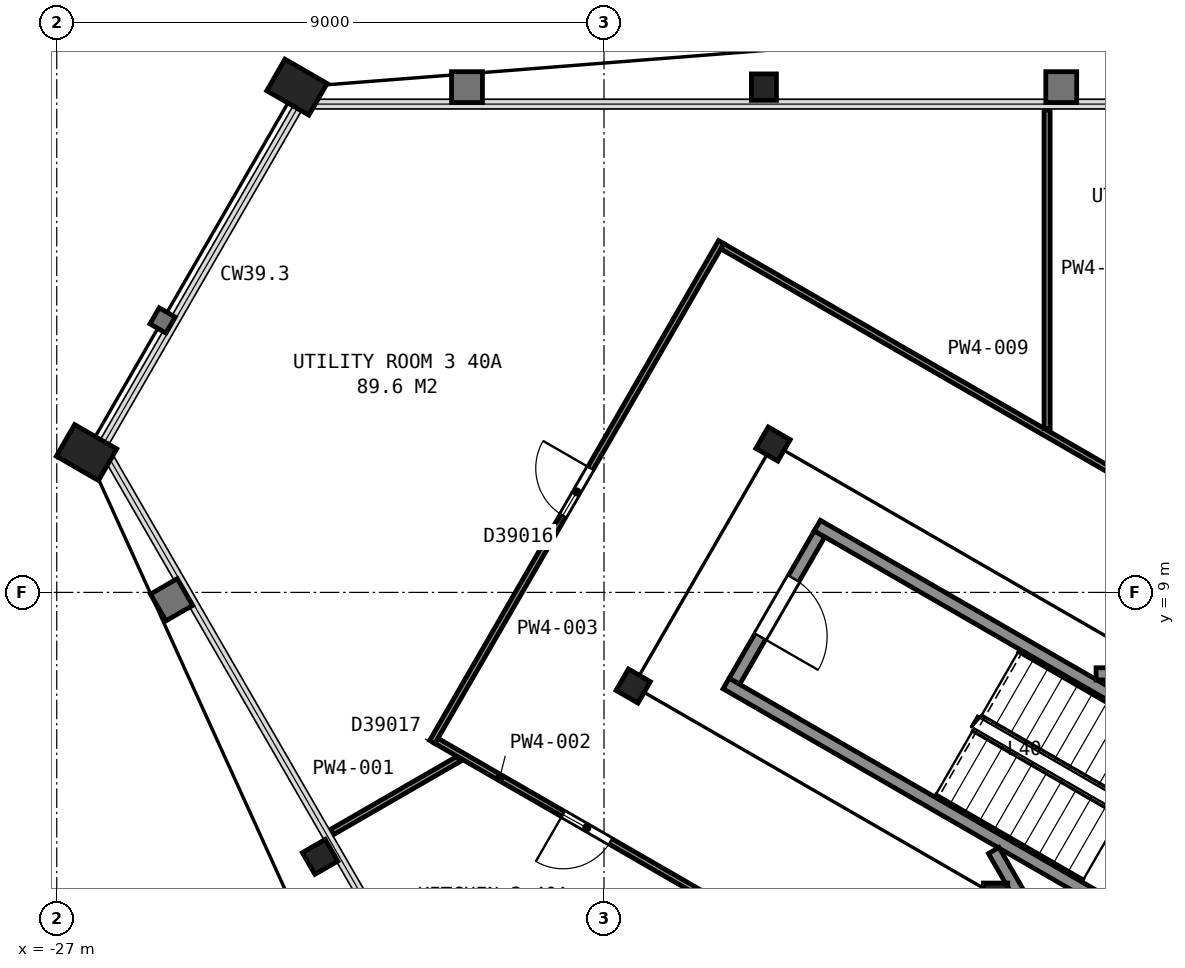
"""IFC4 building model, lengths in metres.
Left out: names, types, materials, properties, quantities, classifications, styles, units other than length and angle.
Written with IfcOpenShell. Run it as: python <this file> out.ifc"""

import sys

from ifc_helpers import new_model, si_unit, direction, frame, frame_2d, origin, origin_2d, place, context, subcontext, project, spatial, rectangle, hollow_rectangle, i_section, extrude, element, fill, save


model = new_model("IFC4")
c1 = context("Model", 3, precision=1e-05, world=origin(), true_north=direction((0.0, 1.0)))
c2 = subcontext(c1, "Body", "Model", "MODEL_VIEW")
j1 = project(units=[si_unit("LENGTHUNIT", "METRE"), si_unit("PLANEANGLEUNIT", "RADIAN")], contexts=[c1])
p1 = place(None, origin())
s1 = spatial("IfcSite", under=j1, at=p1, CompositionType="ELEMENT")
p2 = place(p1, origin())
s2 = spatial("IfcBuilding", under=s1, at=p2, CompositionType="ELEMENT")
p3 = place(p2, frame((0.0, 0.0, 163.6)))
s3 = spatial("IfcBuildingStorey", under=s2, at=p3, CompositionType="ELEMENT", Elevation=163.6)
p4 = place(p3, frame((-15.37, 17.31, 0.0), z_axis=(0.0, 0.0, 1.0), x_axis=(1.0, 0.0, 0.0)))
e1 = element("IfcColumn", 1, at=p4, inside=s3, PredefinedType="COLUMN", context=c2, shape_type="SweptSolid", body=[
    extrude(i_section(OverallWidth=0.411, OverallDepth=0.434, WebThickness=0.036, FlangeThickness=0.057, FilletRadius=0.015, at=origin_2d()), origin(), (0.0, 0.0, 1.0), 3.7),
])
for number, where, z_axis, x_axis in (
    (2, (-23.05, 17.31, 0.0), (0.0, 0.0, 1.0), (0.5, 0.866, 0.0)),
    (3, (-26.51, 11.3, 0.0), (0.0, 0.0, 1.0), (0.5, 0.866, 0.0)),
):
    element("IfcColumn", number, at=place(p3, frame(where, z_axis=z_axis, x_axis=x_axis)), inside=s3, PredefinedType="COLUMN", context=c2, shape_type="SweptSolid", body=[
        extrude(hollow_rectangle(XDim=0.6, YDim=0.8, WallThickness=0.05, at=origin_2d()), origin(), (0.0, 0.0, 1.0), 3.7),
    ])
p5 = place(p3, frame((-22.67, 4.65, 0.0), z_axis=(0.0, 0.0, 1.0), x_axis=(-0.5, 0.866025403784, 0.0)))
e4 = element("IfcColumn", 4, at=p5, inside=s3, PredefinedType="COLUMN", context=c2, shape_type="SweptSolid", body=[
    extrude(i_section(OverallWidth=0.411, OverallDepth=0.434, WebThickness=0.036, FlangeThickness=0.057, FilletRadius=0.015, at=origin_2d()), origin(), (0.0, 0.0, 1.0), 3.7),
])
for number, where, z_axis, x_axis in (
    (5, (-15.22, 11.44, 0.0), (0.0, 0.0, 1.0), (0.5, 0.866, 0.0)),
    (6, (-17.52, 7.46, 0.0), (0.0, 0.0, 1.0), (0.5, 0.866, 0.0)),
):
    element("IfcColumn", number, at=place(p3, frame(where, z_axis=z_axis, x_axis=x_axis)), inside=s3, PredefinedType="COLUMN", context=c2, shape_type="SweptSolid", body=[
        extrude(i_section(OverallWidth=0.406, OverallDepth=0.417, WebThickness=0.03, FlangeThickness=0.048, FilletRadius=0.015, at=origin_2d()), origin(), (0.0, 0.0, 1.0), 3.7),
    ])
p6 = place(p3, frame((-11.56, 4.02, 0.0), z_axis=(0.0, 0.0, 1.0), x_axis=(1.0, 0.0, 0.0)))
e7 = element("IfcColumn", 7, at=p6, inside=s3, PredefinedType="COLUMN", context=c2, shape_type="SweptSolid", body=[
    extrude(i_section(OverallWidth=0.401, OverallDepth=0.399, WebThickness=0.025, FlangeThickness=0.04, FilletRadius=0.015, at=origin_2d()), origin(), (0.0, 0.0, 1.0), 3.7),
])
p7 = place(p3, frame((-14.455, 9.962, 0.0), z_axis=(0.0, 0.0, 1.0), x_axis=(-0.500049511043, -0.865996816683, 0.0)))
e8 = element("IfcWall", 8, at=p7, inside=s3, PredefinedType="PARTITIONING", context=c2, shape_type="SweptSolid", body=[
    extrude(rectangle(XDim=2.8, YDim=0.2, at=frame_2d((1.4, 0.0))), origin(), (0.0, 0.0, 1.0), 3.45),
])
p8 = place(p7, frame((0.85, 0.0, 0.0)))
e9 = element("IfcOpeningElement", 9, at=p8, cuts=e8, PredefinedType="OPENING", context=c2, shape_type="SweptSolid", body=[
    extrude(rectangle(XDim=1.1, YDim=2.1, at=frame_2d((0.55, 1.05))), frame((0.0, 0.11, 0.0), z_axis=(0.0, -1.0, 0.0), x_axis=(1.0, 0.0, 0.0)), (0.0, 0.0, 1.0), 0.22),
])
for number, where, z_axis, x_axis in (
    (10, (-7.678, 2.701, 0.0), (0.0, 0.0, 1.0), (-0.866, 0.5, 0.0)),
    (11, (-6.178, 5.299, 0.0), (0.0, 0.0, 1.0), (-0.866, 0.5, 0.0)),
):
    element("IfcWall", number, at=place(p3, frame(where, z_axis=z_axis, x_axis=x_axis)), inside=s3, PredefinedType="PARTITIONING", context=c2, shape_type="SweptSolid", body=[
        extrude(rectangle(XDim=9.6, YDim=0.2, at=frame_2d((4.8, 0.0))), origin(), (0.0, 0.0, 1.0), 3.45),
    ])
p9 = place(p3, frame((-11.591, 4.755, 0.0), z_axis=(0.0, 0.0, 1.0), x_axis=(0.500043977787, -0.866000011708, 0.0)))
e12 = element("IfcWall", 12, at=p9, inside=s3, PredefinedType="PARTITIONING", context=c2, shape_type="SweptSolid", body=[
    extrude(rectangle(XDim=6.617, YDim=0.2, at=frame_2d((3.308, 0.0))), origin(), (0.0, 0.0, 1.0), 3.45),
])
p10 = place(p9, frame((3.695, 0.0, 0.0)))
e13 = element("IfcOpeningElement", 13, at=p10, cuts=e12, PredefinedType="OPENING", context=c2, shape_type="SweptSolid", body=[
    extrude(rectangle(XDim=1.8, YDim=2.1, at=frame_2d((0.9, 1.05))), frame((0.0, 0.11, 0.0), z_axis=(0.0, -1.0, 0.0), x_axis=(1.0, 0.0, 0.0)), (0.0, 0.0, 1.0), 0.22),
])
p11 = place(p3, frame((-9.908, 7.66, 0.0), z_axis=(0.0, 0.0, 1.0), x_axis=(1.0, 0.0, 0.0)))
e14 = element("IfcWall", 14, at=p11, inside=s3, PredefinedType="PARTITIONING", context=c2, shape_type="SweptSolid", body=[
    extrude(rectangle(XDim=3.621, YDim=0.2, at=frame_2d((1.811, 0.0))), origin(), (0.0, 0.0, 1.0), 3.45),
])
p12 = place(p3, frame((-22.475, 5.058, 0.0), z_axis=(0.0, 0.0, 1.0), x_axis=(0.865953976614, 0.500123695086, 0.0)))
e15 = element("IfcWall", 15, at=p12, inside=s3, PredefinedType="PARTITIONING", context=c2, shape_type="SweptSolid", body=[
    extrude(rectangle(XDim=2.405, YDim=0.1, at=frame_2d((1.203, 0.0))), origin(), (0.0, 0.0, 1.0), 2.713),
])
p13 = place(p3, frame((-16.229, 3.944, 0.0), z_axis=(0.0, 0.0, 1.0), x_axis=(-0.866079026679, 0.499907110918, 0.0)))
e16 = element("IfcWall", 16, at=p13, inside=s3, PredefinedType="PARTITIONING", context=c2, shape_type="SweptSolid", body=[
    extrude(rectangle(XDim=5.227, YDim=0.1, at=frame_2d((2.613, 0.0))), origin(), (0.0, 0.0, 1.0), 2.713),
])
p14 = place(p13, frame((1.921, 0.0, 0.0)))
e17 = element("IfcOpeningElement", 17, at=p14, cuts=e16, PredefinedType="OPENING", context=c2, shape_type="SweptSolid", body=[
    extrude(rectangle(XDim=0.9, YDim=2.1, at=frame_2d((0.45, 1.05))), frame((0.0, 0.06, 0.0), z_axis=(0.0, -1.0, 0.0), x_axis=(1.0, 0.0, 0.0)), (0.0, 0.0, 1.0), 0.12),
])
p15 = place(p3, frame((-20.824, 6.539, 0.0), z_axis=(0.0, 0.0, 1.0), x_axis=(0.500297300687, 0.865853689098, 0.0)))
e18 = element("IfcWall", 18, at=p15, inside=s3, PredefinedType="PARTITIONING", context=c2, shape_type="SweptSolid", body=[
    extrude(rectangle(XDim=9.496, YDim=0.1, at=frame_2d((4.748, 0.0))), origin(), (0.0, 0.0, 1.0), 2.713),
])
p16 = place(p15, frame((4.3, 0.0, 0.0)))
e19 = element("IfcOpeningElement", 19, at=p16, cuts=e18, PredefinedType="OPENING", context=c2, shape_type="SweptSolid", body=[
    extrude(rectangle(XDim=0.9, YDim=2.1, at=frame_2d((0.45, 1.05))), frame((0.0, 0.06, 0.0), z_axis=(0.0, -1.0, 0.0), x_axis=(1.0, 0.0, 0.0)), (0.0, 0.0, 1.0), 0.12),
])
p17 = place(p3, frame((-16.055, 14.693, 0.0), z_axis=(0.0, 0.0, 1.0), x_axis=(0.866070360466, -0.499922124658, 0.0)))
e20 = element("IfcWall", 20, at=p17, inside=s3, PredefinedType="PARTITIONING", context=c2, shape_type="SweptSolid", body=[
    extrude(rectangle(XDim=8.503, YDim=0.1, at=frame_2d((4.251, 0.0))), origin(), (0.0, 0.0, 1.0), 2.713),
])
p18 = place(p3, frame((-10.713, 11.697, 0.0), z_axis=(0.0, 0.0, 1.0), x_axis=(0.0, 1.0, 0.0)))
e21 = element("IfcWall", 21, at=p18, inside=s3, PredefinedType="PARTITIONING", context=c2, shape_type="SweptSolid", body=[
    extrude(rectangle(XDim=5.239, YDim=0.1, at=frame_2d((2.619, 0.0))), origin(), (0.0, 0.0, 1.0), 2.713),
])
p19 = place(p8, origin())
e22 = element("IfcDoor", 22, at=p19, inside=s3, OperationType="SINGLE_SWING_RIGHT", PredefinedType="DOOR", context=c2, shape_type="SweptSolid", body=[
    extrude(rectangle(XDim=1.1, YDim=2.1, at=frame_2d((0.55, 1.05))), frame((0.0, 0.025, 0.0), z_axis=(0.0, -1.0, 0.0), x_axis=(1.0, 0.0, 0.0)), (0.0, 0.0, 1.0), 0.05),
])
fill(e9, e22)
p20 = place(p14, origin())
e23 = element("IfcDoor", 23, at=p20, inside=s3, OperationType="SINGLE_SWING_RIGHT", PredefinedType="DOOR", context=c2, shape_type="SweptSolid", body=[
    extrude(rectangle(XDim=0.9, YDim=2.1, at=frame_2d((0.45, 1.05))), frame((0.0, 0.025, 0.0), z_axis=(0.0, -1.0, 0.0), x_axis=(1.0, 0.0, 0.0)), (0.0, 0.0, 1.0), 0.05),
])
fill(e17, e23)
p21 = place(p16, origin())
e24 = element("IfcDoor", 24, at=p21, inside=s3, OperationType="SINGLE_SWING_RIGHT", PredefinedType="DOOR", context=c2, shape_type="SweptSolid", body=[
    extrude(rectangle(XDim=0.9, YDim=2.1, at=frame_2d((0.45, 1.05))), frame((0.0, 0.025, 0.0), z_axis=(0.0, -1.0, 0.0), x_axis=(1.0, 0.0, 0.0)), (0.0, 0.0, 1.0), 0.05),
])
fill(e19, e24)
save(model, sys.argv[1])
